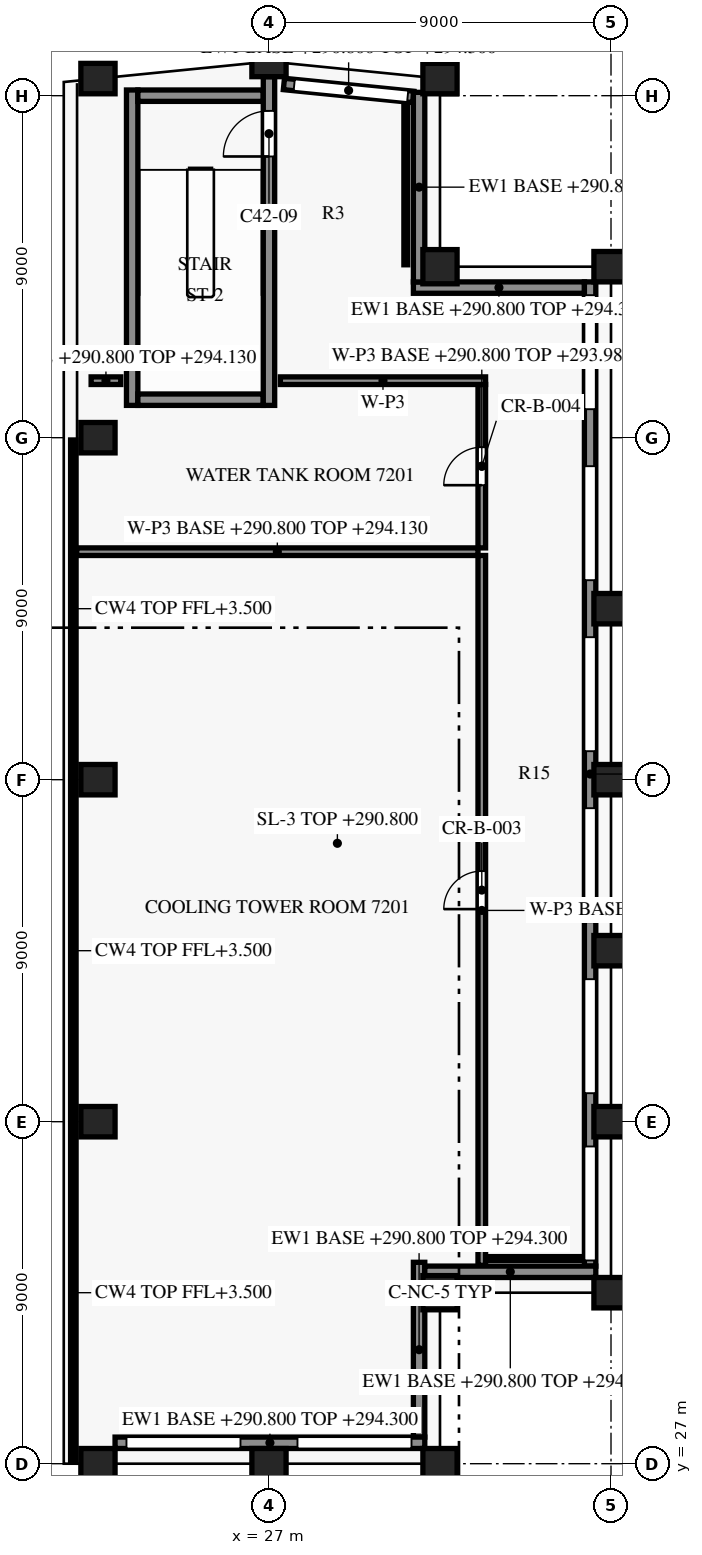
"""IFC4 building model, lengths in metres.
Left out: names, types, materials, properties, quantities, classifications, styles, units other than length and angle.
Written with IfcOpenShell. Run it as: python <this file> out.ifc"""

import sys

from ifc_helpers import new_model, si_unit, direction, frame, frame_2d, origin, origin_2d, place, context, subcontext, project, spatial, rectangle, extrude, element, fill, save


model = new_model("IFC4")
c1 = context("Model", 3, precision=1e-05, world=origin(), true_north=direction((0.0, 1.0)))
c2 = subcontext(c1, "Body", "Model", "MODEL_VIEW")
j1 = project(units=[si_unit("LENGTHUNIT", "METRE"), si_unit("PLANEANGLEUNIT", "RADIAN")], contexts=[c1])
p1 = place(None, origin())
s1 = spatial("IfcSite", under=j1, at=p1, CompositionType="ELEMENT")
p2 = place(p1, origin())
s2 = spatial("IfcBuilding", under=s1, at=p2, CompositionType="ELEMENT")
p3 = place(p2, frame((0.0, 0.0, 290.8)))
s3 = spatial("IfcBuildingStorey", under=s2, at=p3, CompositionType="ELEMENT", Elevation=290.8)
for number, where, z_axis, x_axis in (
    (1, (36.0, 31.5, 0.0), (0.0, 0.0, 1.0), (0.0, 1.0, 0.0)),
    (2, (36.0, 36.0, 0.0), (0.0, 0.0, 1.0), (0.0, 1.0, 0.0)),
    (3, (36.0, 40.5, 0.0), (0.0, 0.0, 1.0), (0.0, 1.0, 0.0)),
    (4, (36.0, 45.0, 0.0), (0.0, 0.0, 1.0), (0.0, 1.0, 0.0)),
    (5, (36.0, 49.5, 0.0), (0.0, 0.0, 1.0), (0.0, 1.0, 0.0)),
    (6, (36.0, 58.5, 0.0), (0.0, 0.0, 1.0), (0.0, 1.0, 0.0)),
    (7, (31.5, 63.45, 0.0), (0.0, 0.0, 1.0), (-0.995, 0.1, 0.0)),
    (8, (27.0, 63.9, 0.0), (0.0, 0.0, 1.0), (-1.0, 0.0, 0.0)),
    (9, (22.5, 63.45, 0.0), (0.0, 0.0, 1.0), (-0.995, -0.1, 0.0)),
    (10, (22.5, 54.0, 0.0), (0.0, 0.0, 1.0), (1.0, 0.0, 0.0)),
    (11, (22.5, 45.0, 0.0), (0.0, 0.0, 1.0), (1.0, 0.0, 0.0)),
    (12, (22.5, 36.0, 0.0), (0.0, 0.0, 1.0), (1.0, 0.0, 0.0)),
):
    element("IfcColumn", number, at=place(p3, frame(where, z_axis=z_axis, x_axis=x_axis)), inside=s3, PredefinedType="COLUMN", context=c2, shape_type="SweptSolid", body=[
        extrude(rectangle(XDim=0.9, YDim=0.8, at=origin_2d()), origin(), (0.0, 0.0, 1.0), 4.0),
    ])
for number, where, z_axis, x_axis in (
    (13, (31.5, 31.5, 0.0), (0.0, 0.0, 1.0), (1.0, 0.0, 0.0)),
    (14, (31.5, 58.5, 0.0), (0.0, 0.0, 1.0), (1.0, 0.0, 0.0)),
):
    element("IfcColumn", number, at=place(p3, frame(where, z_axis=z_axis, x_axis=x_axis)), inside=s3, PredefinedType="COLUMN", context=c2, shape_type="SweptSolid", body=[
        extrude(rectangle(XDim=0.9, YDim=0.9, at=origin_2d()), origin(), (0.0, 0.0, 1.0), 4.0),
    ])
for number, where, z_axis, x_axis in (
    (15, (22.5, 27.0, 0.0), (0.0, 0.0, 1.0), (1.0, 0.0, 0.0)),
    (16, (27.0, 27.0, 0.0), (0.0, 0.0, 1.0), (1.0, 0.0, 0.0)),
    (17, (31.5, 27.0, 0.0), (0.0, 0.0, 1.0), (1.0, 0.0, 0.0)),
):
    element("IfcColumn", number, at=place(p3, frame(where, z_axis=z_axis, x_axis=x_axis)), inside=s3, PredefinedType="COLUMN", context=c2, shape_type="SweptSolid", body=[
        extrude(rectangle(XDim=0.9, YDim=0.8, at=origin_2d()), origin(), (0.0, 0.0, 1.0), 4.0),
    ])
p4 = place(p3, frame((31.1, 27.55, 0.0), z_axis=(0.0, 0.0, 1.0), x_axis=(-1.0, 0.0, 0.0)))
e18 = element("IfcWall", 18, at=p4, inside=s3, PredefinedType="SOLIDWALL", context=c2, shape_type="SweptSolid", body=[
    extrude(rectangle(XDim=8.15, YDim=0.3, at=frame_2d((4.075, 0.0))), origin(), (0.0, 0.0, 1.0), 3.5),
])
p5 = place(p4, frame((0.35, 0.0, 0.9)))
e19 = element("IfcOpeningElement", 19, at=p5, cuts=e18, PredefinedType="OPENING", context=c2, shape_type="SweptSolid", body=[
    extrude(rectangle(XDim=3.0, YDim=1.8, at=frame_2d((1.5, 0.9))), frame((0.0, 0.16, 0.0), z_axis=(0.0, -1.0, 0.0), x_axis=(1.0, 0.0, 0.0)), (0.0, 0.0, 1.0), 0.32),
])
p6 = place(p4, frame((4.85, 0.0, 0.9)))
e20 = element("IfcOpeningElement", 20, at=p6, cuts=e18, PredefinedType="OPENING", context=c2, shape_type="SweptSolid", body=[
    extrude(rectangle(XDim=3.0, YDim=1.8, at=frame_2d((1.5, 0.9))), frame((0.0, 0.16, 0.0), z_axis=(0.0, -1.0, 0.0), x_axis=(1.0, 0.0, 0.0)), (0.0, 0.0, 1.0), 0.32),
])
p7 = place(p3, frame((30.95, 32.3, 0.0), z_axis=(0.0, 0.0, 1.0), x_axis=(0.0, -1.0, 0.0)))
e21 = element("IfcWall", 21, at=p7, inside=s3, PredefinedType="SOLIDWALL", context=c2, shape_type="SweptSolid", body=[
    extrude(rectangle(XDim=4.6, YDim=0.3, at=frame_2d((2.3, 0.0))), origin(), (0.0, 0.0, 1.0), 3.5),
])
p8 = place(p3, frame((35.6, 32.05, 0.0), z_axis=(0.0, 0.0, 1.0), x_axis=(-1.0, 0.0, 0.0)))
e22 = element("IfcWall", 22, at=p8, inside=s3, PredefinedType="SOLIDWALL", context=c2, shape_type="SweptSolid", body=[
    extrude(rectangle(XDim=4.5, YDim=0.3, at=frame_2d((2.25, 0.0))), origin(), (0.0, 0.0, 1.0), 3.5),
])
p9 = place(p3, frame((35.45, 58.1, 0.0), z_axis=(0.0, 0.0, 1.0), x_axis=(0.0, -1.0, 0.0)))
e23 = element("IfcWall", 23, at=p9, inside=s3, PredefinedType="SOLIDWALL", context=c2, shape_type="SweptSolid", body=[
    extrude(rectangle(XDim=25.902, YDim=0.3, at=frame_2d((12.951, 0.0))), origin(), (0.0, 0.0, 1.0), 3.5),
])
p10 = place(p9, frame((0.35, 0.0, 0.9)))
e24 = element("IfcOpeningElement", 24, at=p10, cuts=e23, PredefinedType="OPENING", context=c2, shape_type="SweptSolid", body=[
    extrude(rectangle(XDim=3.0, YDim=1.8, at=frame_2d((1.5, 0.9))), frame((0.0, 0.16, 0.0), z_axis=(0.0, -1.0, 0.0), x_axis=(1.0, 0.0, 0.0)), (0.0, 0.0, 1.0), 0.32),
])
p11 = place(p9, frame((4.85, 0.0, 0.9)))
e25 = element("IfcOpeningElement", 25, at=p11, cuts=e23, PredefinedType="OPENING", context=c2, shape_type="SweptSolid", body=[
    extrude(rectangle(XDim=3.0, YDim=1.8, at=frame_2d((1.5, 0.9))), frame((0.0, 0.16, 0.0), z_axis=(0.0, -1.0, 0.0), x_axis=(1.0, 0.0, 0.0)), (0.0, 0.0, 1.0), 0.32),
])
p12 = place(p9, frame((9.35, 0.0, 0.9)))
e26 = element("IfcOpeningElement", 26, at=p12, cuts=e23, PredefinedType="OPENING", context=c2, shape_type="SweptSolid", body=[
    extrude(rectangle(XDim=3.0, YDim=1.8, at=frame_2d((1.5, 0.9))), frame((0.0, 0.16, 0.0), z_axis=(0.0, -1.0, 0.0), x_axis=(1.0, 0.0, 0.0)), (0.0, 0.0, 1.0), 0.32),
])
p13 = place(p9, frame((13.85, 0.0, 0.9)))
e27 = element("IfcOpeningElement", 27, at=p13, cuts=e23, PredefinedType="OPENING", context=c2, shape_type="SweptSolid", body=[
    extrude(rectangle(XDim=3.0, YDim=1.8, at=frame_2d((1.5, 0.9))), frame((0.0, 0.16, 0.0), z_axis=(0.0, -1.0, 0.0), x_axis=(1.0, 0.0, 0.0)), (0.0, 0.0, 1.0), 0.32),
])
p14 = place(p9, frame((18.35, 0.0, 0.9)))
e28 = element("IfcOpeningElement", 28, at=p14, cuts=e23, PredefinedType="OPENING", context=c2, shape_type="SweptSolid", body=[
    extrude(rectangle(XDim=3.0, YDim=1.8, at=frame_2d((1.5, 0.9))), frame((0.0, 0.16, 0.0), z_axis=(0.0, -1.0, 0.0), x_axis=(1.0, 0.0, 0.0)), (0.0, 0.0, 1.0), 0.32),
])
p15 = place(p9, frame((22.752, 0.0, 0.9)))
e29 = element("IfcOpeningElement", 29, at=p15, cuts=e23, PredefinedType="OPENING", context=c2, shape_type="SweptSolid", body=[
    extrude(rectangle(XDim=3.0, YDim=1.8, at=frame_2d((1.5, 0.9))), frame((0.0, 0.16, 0.0), z_axis=(0.0, -1.0, 0.0), x_axis=(1.0, 0.0, 0.0)), (0.0, 0.0, 1.0), 0.32),
])
p16 = place(p3, frame((30.8, 57.95, 0.0), z_axis=(0.0, 0.0, 1.0), x_axis=(1.0, 0.0, 0.0)))
e30 = element("IfcWall", 30, at=p16, inside=s3, PredefinedType="SOLIDWALL", context=c2, shape_type="SweptSolid", body=[
    extrude(rectangle(XDim=4.502, YDim=0.3, at=frame_2d((2.251, 0.0))), origin(), (0.0, 0.0, 1.0), 3.5),
])
p17 = place(p3, frame((30.95, 63.088, 0.0), z_axis=(0.0, 0.0, 1.0), x_axis=(0.0, -1.0, 0.0)))
e31 = element("IfcWall", 31, at=p17, inside=s3, PredefinedType="SOLIDWALL", context=c2, shape_type="SweptSolid", body=[
    extrude(rectangle(XDim=4.99, YDim=0.3, at=frame_2d((2.495, 0.0))), origin(), (0.0, 0.0, 1.0), 3.5),
])
p18 = place(p3, frame((27.393, 63.308, 0.0), z_axis=(0.0, 0.0, 1.0), x_axis=(0.995030125493, -0.099574340874, 0.0)))
e32 = element("IfcWall", 32, at=p18, inside=s3, PredefinedType="SOLIDWALL", context=c2, shape_type="SweptSolid", body=[
    extrude(rectangle(XDim=3.423, YDim=0.3, at=frame_2d((1.711, 0.0))), origin(), (0.0, 0.0, 1.0), 3.5),
])
p19 = place(p18, frame((0.273, 0.0, 0.9)))
e33 = element("IfcOpeningElement", 33, at=p19, cuts=e32, PredefinedType="OPENING", context=c2, shape_type="SweptSolid", body=[
    extrude(rectangle(XDim=3.0, YDim=1.8, at=frame_2d((1.5, 0.9))), frame((0.0, 0.16, 0.0), z_axis=(0.0, -1.0, 0.0), x_axis=(1.0, 0.0, 0.0)), (0.0, 0.0, 1.0), 0.32),
])
for number, where, z_axis, x_axis in (
    (34, (23.55, 55.0, 0.0), (0.0, 0.0, 1.0), (1.0, 0.0, 0.0)),
    (35, (23.55, 63.0, 0.0), (0.0, 0.0, 1.0), (1.0, 0.0, 0.0)),
):
    element("IfcWall", number, at=place(p3, frame(where, z_axis=z_axis, x_axis=x_axis)), inside=s3, PredefinedType="SHEAR", context=c2, shape_type="SweptSolid", body=[
        extrude(rectangle(XDim=3.3, YDim=0.3, at=frame_2d((1.65, 0.0))), origin(), (0.0, 0.0, 1.0), 3.7),
    ])
p20 = place(p3, frame((23.4, 54.85, 0.0), z_axis=(0.0, 0.0, 1.0), x_axis=(0.0, 1.0, 0.0)))
e36 = element("IfcWall", 36, at=p20, inside=s3, PredefinedType="SHEAR", context=c2, shape_type="SweptSolid", body=[
    extrude(rectangle(XDim=8.3, YDim=0.3, at=frame_2d((4.15, 0.0))), origin(), (0.0, 0.0, 1.0), 3.7),
])
p21 = place(p3, frame((27.0, 54.85, 0.0), z_axis=(0.0, 0.0, 1.0), x_axis=(0.0, 1.0, 0.0)))
e37 = element("IfcWall", 37, at=p21, inside=s3, PredefinedType="SHEAR", context=c2, shape_type="SweptSolid", body=[
    extrude(rectangle(XDim=8.65, YDim=0.3, at=frame_2d((4.325, 0.0))), origin(), (0.0, 0.0, 1.0), 3.7),
])
p22 = place(p21, frame((6.55, 0.0, 0.0)))
e38 = element("IfcOpeningElement", 38, at=p22, cuts=e37, PredefinedType="OPENING", context=c2, shape_type="SweptSolid", body=[
    extrude(rectangle(XDim=1.2, YDim=2.2, at=frame_2d((0.6, 1.1))), frame((0.0, 0.16, 0.0), z_axis=(0.0, -1.0, 0.0), x_axis=(1.0, 0.0, 0.0)), (0.0, 0.0, 1.0), 0.32),
])
p23 = place(p3, frame((35.28, 32.4, 0.0), z_axis=(0.0, 0.0, 1.0), x_axis=(-1.0, 0.0, 0.0)))
e39 = element("IfcWall", 39, at=p23, inside=s3, PredefinedType="PARTITIONING", context=c2, shape_type="SweptSolid", body=[
    extrude(rectangle(XDim=2.58, YDim=0.1, at=frame_2d((1.29, 0.0))), origin(), (0.0, 0.0, 1.0), 3.68),
])
p24 = place(p3, frame((32.6, 32.22, 0.0), z_axis=(0.0, 0.0, 1.0), x_axis=(0.0, 1.0, 0.0)))
e40 = element("IfcWall", 40, at=p24, inside=s3, PredefinedType="PARTITIONING", context=c2, shape_type="SweptSolid", body=[
    extrude(rectangle(XDim=18.68, YDim=0.2, at=frame_2d((9.34, 0.0))), origin(), (0.0, 0.0, 1.0), 3.18),
])
p25 = place(p24, frame((9.375, 0.0, 0.0)))
e41 = element("IfcOpeningElement", 41, at=p25, cuts=e40, PredefinedType="OPENING", context=c2, shape_type="SweptSolid", body=[
    extrude(rectangle(XDim=1.0, YDim=2.1, at=frame_2d((0.5, 1.05))), frame((0.0, 0.11, 0.0), z_axis=(0.0, -1.0, 0.0), x_axis=(1.0, 0.0, 0.0)), (0.0, 0.0, 1.0), 0.22),
])
p26 = place(p3, frame((21.94, 51.0, 0.0), z_axis=(0.0, 0.0, 1.0), x_axis=(1.0, 0.0, 0.0)))
e42 = element("IfcWall", 42, at=p26, inside=s3, PredefinedType="PARTITIONING", context=c2, shape_type="SweptSolid", body=[
    extrude(rectangle(XDim=10.56, YDim=0.2, at=frame_2d((5.28, 0.0))), origin(), (0.0, 0.0, 1.0), 3.33),
])
p27 = place(p3, frame((32.6, 51.1, 0.0), z_axis=(0.0, 0.0, 1.0), x_axis=(0.0, 1.0, 0.0)))
e43 = element("IfcWall", 43, at=p27, inside=s3, PredefinedType="PARTITIONING", context=c2, shape_type="SweptSolid", body=[
    extrude(rectangle(XDim=4.3, YDim=0.2, at=frame_2d((2.15, 0.0))), origin(), (0.0, 0.0, 1.0), 3.18),
])
p28 = place(p27, frame((1.65, 0.0, 0.0)))
e44 = element("IfcOpeningElement", 44, at=p28, cuts=e43, PredefinedType="OPENING", context=c2, shape_type="SweptSolid", body=[
    extrude(rectangle(XDim=1.0, YDim=2.1, at=frame_2d((0.5, 1.05))), frame((0.0, 0.11, 0.0), z_axis=(0.0, -1.0, 0.0), x_axis=(1.0, 0.0, 0.0)), (0.0, 0.0, 1.0), 0.22),
])
p29 = place(p3, frame((22.32, 55.5, 0.0), z_axis=(0.0, 0.0, 1.0), x_axis=(1.0, 0.0, 0.0)))
e45 = element("IfcWall", 45, at=p29, inside=s3, PredefinedType="PARTITIONING", context=c2, shape_type="SweptSolid", body=[
    extrude(rectangle(XDim=0.78, YDim=0.2, at=frame_2d((0.39, 0.0))), origin(), (0.0, 0.0, 1.0), 3.33),
])
p30 = place(p3, frame((32.7, 55.5, 0.0), z_axis=(0.0, 0.0, 1.0), x_axis=(-1.0, 0.0, 0.0)))
e46 = element("IfcWall", 46, at=p30, inside=s3, PredefinedType="PARTITIONING", context=c2, shape_type="SweptSolid", body=[
    extrude(rectangle(XDim=5.4, YDim=0.2, at=frame_2d((2.7, 0.0))), origin(), (0.0, 0.0, 1.0), 3.68),
])
p31 = place(p3, frame((30.6, 62.816, 0.0), z_axis=(0.0, 0.0, 1.0), x_axis=(0.0, -1.0, 0.0)))
e47 = element("IfcWall", 47, at=p31, inside=s3, PredefinedType="PARTITIONING", context=c2, shape_type="SweptSolid", body=[
    extrude(rectangle(XDim=4.266, YDim=0.1, at=frame_2d((2.133, 0.0))), origin(), (0.0, 0.0, 1.0), 3.68),
])
p32 = place(p5, origin())
e48 = element("IfcWindow", 48, at=p32, inside=s3, PartitioningType="SINGLE_PANEL", PredefinedType="WINDOW", context=c2, shape_type="SweptSolid", body=[
    extrude(rectangle(XDim=3.0, YDim=1.8, at=frame_2d((1.5, 0.9))), frame((0.0, 0.03, 0.0), z_axis=(0.0, -1.0, 0.0), x_axis=(1.0, 0.0, 0.0)), (0.0, 0.0, 1.0), 0.06),
])
fill(e19, e48)
p33 = place(p6, origin())
e49 = element("IfcWindow", 49, at=p33, inside=s3, PartitioningType="SINGLE_PANEL", PredefinedType="WINDOW", context=c2, shape_type="SweptSolid", body=[
    extrude(rectangle(XDim=3.0, YDim=1.8, at=frame_2d((1.5, 0.9))), frame((0.0, 0.03, 0.0), z_axis=(0.0, -1.0, 0.0), x_axis=(1.0, 0.0, 0.0)), (0.0, 0.0, 1.0), 0.06),
])
fill(e20, e49)
p34 = place(p10, origin())
e50 = element("IfcWindow", 50, at=p34, inside=s3, PartitioningType="SINGLE_PANEL", PredefinedType="WINDOW", context=c2, shape_type="SweptSolid", body=[
    extrude(rectangle(XDim=3.0, YDim=1.8, at=frame_2d((1.5, 0.9))), frame((0.0, 0.03, 0.0), z_axis=(0.0, -1.0, 0.0), x_axis=(1.0, 0.0, 0.0)), (0.0, 0.0, 1.0), 0.06),
])
fill(e24, e50)
p35 = place(p11, origin())
e51 = element("IfcWindow", 51, at=p35, inside=s3, PartitioningType="SINGLE_PANEL", PredefinedType="WINDOW", context=c2, shape_type="SweptSolid", body=[
    extrude(rectangle(XDim=3.0, YDim=1.8, at=frame_2d((1.5, 0.9))), frame((0.0, 0.03, 0.0), z_axis=(0.0, -1.0, 0.0), x_axis=(1.0, 0.0, 0.0)), (0.0, 0.0, 1.0), 0.06),
])
fill(e25, e51)
p36 = place(p12, origin())
e52 = element("IfcWindow", 52, at=p36, inside=s3, PartitioningType="SINGLE_PANEL", PredefinedType="WINDOW", context=c2, shape_type="SweptSolid", body=[
    extrude(rectangle(XDim=3.0, YDim=1.8, at=frame_2d((1.5, 0.9))), frame((0.0, 0.03, 0.0), z_axis=(0.0, -1.0, 0.0), x_axis=(1.0, 0.0, 0.0)), (0.0, 0.0, 1.0), 0.06),
])
fill(e26, e52)
p37 = place(p13, origin())
e53 = element("IfcWindow", 53, at=p37, inside=s3, PartitioningType="SINGLE_PANEL", PredefinedType="WINDOW", context=c2, shape_type="SweptSolid", body=[
    extrude(rectangle(XDim=3.0, YDim=1.8, at=frame_2d((1.5, 0.9))), frame((0.0, 0.03, 0.0), z_axis=(0.0, -1.0, 0.0), x_axis=(1.0, 0.0, 0.0)), (0.0, 0.0, 1.0), 0.06),
])
fill(e27, e53)
p38 = place(p14, origin())
e54 = element("IfcWindow", 54, at=p38, inside=s3, PartitioningType="SINGLE_PANEL", PredefinedType="WINDOW", context=c2, shape_type="SweptSolid", body=[
    extrude(rectangle(XDim=3.0, YDim=1.8, at=frame_2d((1.5, 0.9))), frame((0.0, 0.03, 0.0), z_axis=(0.0, -1.0, 0.0), x_axis=(1.0, 0.0, 0.0)), (0.0, 0.0, 1.0), 0.06),
])
fill(e28, e54)
p39 = place(p15, origin())
e55 = element("IfcWindow", 55, at=p39, inside=s3, PartitioningType="SINGLE_PANEL", PredefinedType="WINDOW", context=c2, shape_type="SweptSolid", body=[
    extrude(rectangle(XDim=3.0, YDim=1.8, at=frame_2d((1.5, 0.9))), frame((0.0, 0.03, 0.0), z_axis=(0.0, -1.0, 0.0), x_axis=(1.0, 0.0, 0.0)), (0.0, 0.0, 1.0), 0.06),
])
fill(e29, e55)
p40 = place(p19, origin())
e56 = element("IfcWindow", 56, at=p40, inside=s3, PartitioningType="SINGLE_PANEL", PredefinedType="WINDOW", context=c2, shape_type="SweptSolid", body=[
    extrude(rectangle(XDim=3.0, YDim=1.8, at=frame_2d((1.5, 0.9))), frame((0.0, 0.03, 0.0), z_axis=(0.0, -1.0, 0.0), x_axis=(1.0, 0.0, 0.0)), (0.0, 0.0, 1.0), 0.06),
])
fill(e33, e56)
p41 = place(p22, origin())
e57 = element("IfcDoor", 57, at=p41, inside=s3, OperationType="SINGLE_SWING_LEFT", PredefinedType="DOOR", context=c2, shape_type="SweptSolid", body=[
    extrude(rectangle(XDim=1.2, YDim=2.2, at=frame_2d((0.6, 1.1))), frame((0.0, 0.025, 0.0), z_axis=(0.0, -1.0, 0.0), x_axis=(1.0, 0.0, 0.0)), (0.0, 0.0, 1.0), 0.05),
])
fill(e38, e57)
p42 = place(p25, origin())
e58 = element("IfcDoor", 58, at=p42, inside=s3, OperationType="SINGLE_SWING_LEFT", PredefinedType="DOOR", context=c2, shape_type="SweptSolid", body=[
    extrude(rectangle(XDim=1.0, YDim=2.1, at=frame_2d((0.5, 1.05))), frame((0.0, 0.025, 0.0), z_axis=(0.0, -1.0, 0.0), x_axis=(1.0, 0.0, 0.0)), (0.0, 0.0, 1.0), 0.05),
])
fill(e41, e58)
p43 = place(p28, origin())
e59 = element("IfcDoor", 59, at=p43, inside=s3, OperationType="SINGLE_SWING_RIGHT", PredefinedType="DOOR", context=c2, shape_type="SweptSolid", body=[
    extrude(rectangle(XDim=1.0, YDim=2.1, at=frame_2d((0.5, 1.05))), frame((0.0, 0.025, 0.0), z_axis=(0.0, -1.0, 0.0), x_axis=(1.0, 0.0, 0.0)), (0.0, 0.0, 1.0), 0.05),
])
fill(e44, e59)
save(model, sys.argv[1])
